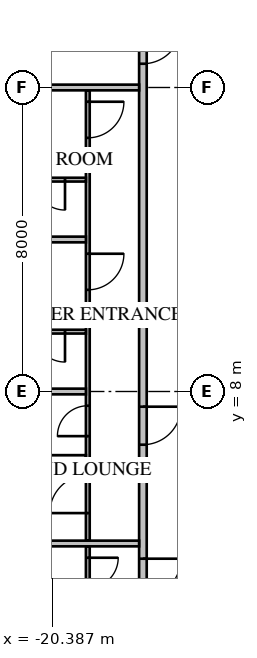
"""IFC4 building model, lengths in metres.
Left out: names, types, materials, properties, quantities, classifications, styles, units other than length and angle.
Written with IfcOpenShell. Run it as: python <this file> out.ifc"""

import sys

from ifc_helpers import new_model, si_unit, direction, frame, frame_2d, origin, place, context, subcontext, project, spatial, rectangle, extrude, element, fill, save


model = new_model("IFC4")
c1 = context("Model", 3, precision=1e-05, world=origin(), true_north=direction((0.0, 1.0)))
c2 = subcontext(c1, "Body", "Model", "MODEL_VIEW")
j1 = project(units=[si_unit("LENGTHUNIT", "METRE"), si_unit("PLANEANGLEUNIT", "RADIAN")], contexts=[c1])
p1 = place(None, origin())
s1 = spatial("IfcSite", under=j1, at=p1, CompositionType="ELEMENT")
p2 = place(p1, origin())
s2 = spatial("IfcBuilding", under=s1, at=p2, CompositionType="ELEMENT")
p3 = place(p2, frame((0.0, 0.0, 23.7)))
s3 = spatial("IfcBuildingStorey", under=s2, at=p3, CompositionType="ELEMENT", Elevation=23.7)
p4 = place(p3, frame((-18.0, 18.0, 0.0), z_axis=(0.0, 0.0, 1.0), x_axis=(0.0, -1.0, 0.0)))
e1 = element("IfcWall", 1, at=p4, inside=s3, PredefinedType="PARTITIONING", context=c2, shape_type="SweptSolid", body=[
    extrude(rectangle(XDim=36.0, YDim=0.2, at=frame_2d((18.0, 0.0))), origin(), (0.0, 0.0, 1.0), 3.65),
])
p5 = place(p4, frame((10.4, 0.0, 0.0)))
e2 = element("IfcOpeningElement", 2, at=p5, cuts=e1, PredefinedType="OPENING", context=c2, shape_type="SweptSolid", body=[
    extrude(rectangle(XDim=1.0, YDim=2.1, at=frame_2d((0.5, 1.05))), frame((0.0, 0.12, 0.0), z_axis=(0.0, -1.0, 0.0), x_axis=(1.0, 0.0, 0.0)), (0.0, 0.0, 1.0), 0.24),
])
p6 = place(p4, frame((14.4, 0.0, 0.0)))
e3 = element("IfcOpeningElement", 3, at=p6, cuts=e1, PredefinedType="OPENING", context=c2, shape_type="SweptSolid", body=[
    extrude(rectangle(XDim=1.0, YDim=2.1, at=frame_2d((0.5, 1.05))), frame((0.0, 0.12, 0.0), z_axis=(0.0, -1.0, 0.0), x_axis=(1.0, 0.0, 0.0)), (0.0, 0.0, 1.0), 0.24),
])
p7 = place(p4, frame((0.375, 0.0, 0.0)))
e4 = element("IfcOpeningElement", 4, at=p7, cuts=e1, PredefinedType="OPENING", context=c2, shape_type="SweptSolid", body=[
    extrude(rectangle(XDim=1.0, YDim=2.1, at=frame_2d((0.5, 1.05))), frame((0.0, 0.12, 0.0), z_axis=(0.0, -1.0, 0.0), x_axis=(1.0, 0.0, 0.0)), (0.0, 0.0, 1.0), 0.24),
])
p8 = place(p4, frame((34.375, 0.0, 0.0)))
e5 = element("IfcOpeningElement", 5, at=p8, cuts=e1, PredefinedType="OPENING", context=c2, shape_type="SweptSolid", body=[
    extrude(rectangle(XDim=0.95, YDim=2.1, at=frame_2d((0.475, 1.05))), frame((0.0, 0.12, 0.0), z_axis=(0.0, -1.0, 0.0), x_axis=(1.0, 0.0, 0.0)), (0.0, 0.0, 1.0), 0.24),
])
p9 = place(p3, frame((-19.45, 15.925, 0.0), z_axis=(0.0, 0.0, 1.0), x_axis=(0.0, -1.0, 0.0)))
e6 = element("IfcWall", 6, at=p9, inside=s3, PredefinedType="PARTITIONING", context=c2, shape_type="SweptSolid", body=[
    extrude(rectangle(XDim=11.85, YDim=0.1, at=frame_2d((5.925, 0.0))), origin(), (0.0, 0.0, 1.0), 3.65),
])
p10 = place(p9, frame((10.125, 0.0, 0.0)))
e7 = element("IfcOpeningElement", 7, at=p10, cuts=e6, PredefinedType="OPENING", context=c2, shape_type="SweptSolid", body=[
    extrude(rectangle(XDim=1.0, YDim=2.1, at=frame_2d((0.5, 1.05))), frame((0.0, 0.07, 0.0), z_axis=(0.0, -1.0, 0.0), x_axis=(1.0, 0.0, 0.0)), (0.0, 0.0, 1.0), 0.14),
])
p11 = place(p9, frame((8.3, 0.0, 0.0)))
e8 = element("IfcOpeningElement", 8, at=p11, cuts=e6, PredefinedType="OPENING", context=c2, shape_type="SweptSolid", body=[
    extrude(rectangle(XDim=0.8, YDim=2.1, at=frame_2d((0.4, 1.05))), frame((0.0, 0.07, 0.0), z_axis=(0.0, -1.0, 0.0), x_axis=(1.0, 0.0, 0.0)), (0.0, 0.0, 1.0), 0.14),
])
p12 = place(p9, frame((0.3, 0.0, 0.0)))
e9 = element("IfcOpeningElement", 9, at=p12, cuts=e6, PredefinedType="OPENING", context=c2, shape_type="SweptSolid", body=[
    extrude(rectangle(XDim=0.95, YDim=2.1, at=frame_2d((0.475, 1.05))), frame((0.0, 0.07, 0.0), z_axis=(0.0, -1.0, 0.0), x_axis=(1.0, 0.0, 0.0)), (0.0, 0.0, 1.0), 0.14),
])
p13 = place(p9, frame((4.3, 0.0, 0.0)))
e10 = element("IfcOpeningElement", 10, at=p13, cuts=e6, PredefinedType="OPENING", context=c2, shape_type="SweptSolid", body=[
    extrude(rectangle(XDim=0.95, YDim=2.1, at=frame_2d((0.475, 1.05))), frame((0.0, 0.07, 0.0), z_axis=(0.0, -1.0, 0.0), x_axis=(1.0, 0.0, 0.0)), (0.0, 0.0, 1.0), 0.14),
])
p14 = place(p3, frame((-19.5, 6.275, 0.0), z_axis=(0.0, 0.0, 1.0), x_axis=(-1.0, 0.0, 0.0)))
e11 = element("IfcWall", 11, at=p14, inside=s3, PredefinedType="PARTITIONING", context=c2, shape_type="SweptSolid", body=[
    extrude(rectangle(XDim=2.1, YDim=0.1, at=frame_2d((1.05, 0.0))), origin(), (0.0, 0.0, 1.0), 3.65),
])
p15 = place(p3, frame((-19.45, 3.925, 0.0), z_axis=(0.0, 0.0, 1.0), x_axis=(0.0, -1.0, 0.0)))
e12 = element("IfcWall", 12, at=p15, inside=s3, PredefinedType="PARTITIONING", context=c2, shape_type="SweptSolid", body=[
    extrude(rectangle(XDim=19.85, YDim=0.1, at=frame_2d((9.925, 0.0))), origin(), (0.0, 0.0, 1.0), 3.65),
])
p16 = place(p15, frame((2.125, 0.0, 0.0)))
e13 = element("IfcOpeningElement", 13, at=p16, cuts=e12, PredefinedType="OPENING", context=c2, shape_type="SweptSolid", body=[
    extrude(rectangle(XDim=1.0, YDim=2.1, at=frame_2d((0.5, 1.05))), frame((0.0, 0.07, 0.0), z_axis=(0.0, -1.0, 0.0), x_axis=(1.0, 0.0, 0.0)), (0.0, 0.0, 1.0), 0.14),
])
p17 = place(p15, frame((0.3, 0.0, 0.0)))
e14 = element("IfcOpeningElement", 14, at=p17, cuts=e12, PredefinedType="OPENING", context=c2, shape_type="SweptSolid", body=[
    extrude(rectangle(XDim=0.8, YDim=2.1, at=frame_2d((0.4, 1.05))), frame((0.0, 0.07, 0.0), z_axis=(0.0, -1.0, 0.0), x_axis=(1.0, 0.0, 0.0)), (0.0, 0.0, 1.0), 0.14),
])
p18 = place(p15, frame((4.3, 0.0, 0.0)))
e15 = element("IfcOpeningElement", 15, at=p18, cuts=e12, PredefinedType="OPENING", context=c2, shape_type="SweptSolid", body=[
    extrude(rectangle(XDim=0.95, YDim=2.1, at=frame_2d((0.475, 1.05))), frame((0.0, 0.07, 0.0), z_axis=(0.0, -1.0, 0.0), x_axis=(1.0, 0.0, 0.0)), (0.0, 0.0, 1.0), 0.14),
])
p19 = place(p15, frame((8.3, 0.0, 0.0)))
e16 = element("IfcOpeningElement", 16, at=p19, cuts=e12, PredefinedType="OPENING", context=c2, shape_type="SweptSolid", body=[
    extrude(rectangle(XDim=0.95, YDim=2.1, at=frame_2d((0.475, 1.05))), frame((0.0, 0.07, 0.0), z_axis=(0.0, -1.0, 0.0), x_axis=(1.0, 0.0, 0.0)), (0.0, 0.0, 1.0), 0.14),
])
p20 = place(p15, frame((12.3, 0.0, 0.0)))
e17 = element("IfcOpeningElement", 17, at=p20, cuts=e12, PredefinedType="OPENING", context=c2, shape_type="SweptSolid", body=[
    extrude(rectangle(XDim=0.95, YDim=2.1, at=frame_2d((0.475, 1.05))), frame((0.0, 0.07, 0.0), z_axis=(0.0, -1.0, 0.0), x_axis=(1.0, 0.0, 0.0)), (0.0, 0.0, 1.0), 0.14),
])
p21 = place(p15, frame((16.3, 0.0, 0.0)))
e18 = element("IfcOpeningElement", 18, at=p21, cuts=e12, PredefinedType="OPENING", context=c2, shape_type="SweptSolid", body=[
    extrude(rectangle(XDim=0.95, YDim=2.1, at=frame_2d((0.475, 1.05))), frame((0.0, 0.07, 0.0), z_axis=(0.0, -1.0, 0.0), x_axis=(1.0, 0.0, 0.0)), (0.0, 0.0, 1.0), 0.14),
])
p22 = place(p3, frame((-18.1, 16.0, 0.0), z_axis=(0.0, 0.0, 1.0), x_axis=(-1.0, 0.0, 0.0)))
e19 = element("IfcWall", 19, at=p22, inside=s3, PredefinedType="PARTITIONING", context=c2, shape_type="SweptSolid", body=[
    extrude(rectangle(XDim=6.589, YDim=0.15, at=frame_2d((3.295, 0.0))), origin(), (0.0, 0.0, 1.0), 3.65),
])
for number, where, z_axis, x_axis in (
    (20, (-19.5, 12.0, 0.0), (0.0, 0.0, 1.0), (-1.0, 0.0, 0.0)),
    (21, (-19.5, 8.0, 0.0), (0.0, 0.0, 1.0), (-1.0, 0.0, 0.0)),
):
    element("IfcWall", number, at=place(p3, frame(where, z_axis=z_axis, x_axis=x_axis)), inside=s3, PredefinedType="PARTITIONING", context=c2, shape_type="SweptSolid", body=[
        extrude(rectangle(XDim=5.2, YDim=0.15, at=frame_2d((2.6, 0.0))), origin(), (0.0, 0.0, 1.0), 3.65),
    ])
p23 = place(p3, frame((-18.1, 4.0, 0.0), z_axis=(0.0, 0.0, 1.0), x_axis=(-1.0, 0.0, 0.0)))
e22 = element("IfcWall", 22, at=p23, inside=s3, PredefinedType="PARTITIONING", context=c2, shape_type="SweptSolid", body=[
    extrude(rectangle(XDim=6.6, YDim=0.15, at=frame_2d((3.3, 0.0))), origin(), (0.0, 0.0, 1.0), 3.65),
])
p24 = place(p3, frame((-19.5, 13.575, 0.0), z_axis=(0.0, 0.0, 1.0), x_axis=(-1.0, 0.0, 0.0)))
e23 = element("IfcWall", 23, at=p24, inside=s3, PredefinedType="PARTITIONING", context=c2, shape_type="SweptSolid", body=[
    extrude(rectangle(XDim=2.7, YDim=0.1, at=frame_2d((1.35, 0.0))), origin(), (0.0, 0.0, 1.0), 3.65),
])
p25 = place(p24, frame((0.55, 0.0, 0.0)))
e24 = element("IfcOpeningElement", 24, at=p25, cuts=e23, PredefinedType="OPENING", context=c2, shape_type="SweptSolid", body=[
    extrude(rectangle(XDim=0.8, YDim=2.1, at=frame_2d((0.4, 1.05))), frame((0.0, 0.07, 0.0), z_axis=(0.0, -1.0, 0.0), x_axis=(1.0, 0.0, 0.0)), (0.0, 0.0, 1.0), 0.14),
])
p26 = place(p3, frame((-19.5, 9.575, 0.0), z_axis=(0.0, 0.0, 1.0), x_axis=(-1.0, 0.0, 0.0)))
e25 = element("IfcWall", 25, at=p26, inside=s3, PredefinedType="PARTITIONING", context=c2, shape_type="SweptSolid", body=[
    extrude(rectangle(XDim=2.7, YDim=0.1, at=frame_2d((1.35, 0.0))), origin(), (0.0, 0.0, 1.0), 3.65),
])
p27 = place(p26, frame((0.55, 0.0, 0.0)))
e26 = element("IfcOpeningElement", 26, at=p27, cuts=e25, PredefinedType="OPENING", context=c2, shape_type="SweptSolid", body=[
    extrude(rectangle(XDim=0.8, YDim=2.1, at=frame_2d((0.4, 1.05))), frame((0.0, 0.07, 0.0), z_axis=(0.0, -1.0, 0.0), x_axis=(1.0, 0.0, 0.0)), (0.0, 0.0, 1.0), 0.14),
])
p28 = place(p5, origin())
e27 = element("IfcDoor", 27, at=p28, inside=s3, OperationType="SINGLE_SWING_LEFT", PredefinedType="DOOR", context=c2, shape_type="SweptSolid", body=[
    extrude(rectangle(XDim=1.0, YDim=2.1, at=frame_2d((0.5, 1.05))), frame((0.0, 0.025, 0.0), z_axis=(0.0, -1.0, 0.0), x_axis=(1.0, 0.0, 0.0)), (0.0, 0.0, 1.0), 0.05),
])
fill(e2, e27)
p29 = place(p10, origin())
e28 = element("IfcDoor", 28, at=p29, inside=s3, OperationType="SINGLE_SWING_RIGHT", PredefinedType="DOOR", context=c2, shape_type="SweptSolid", body=[
    extrude(rectangle(XDim=1.0, YDim=2.1, at=frame_2d((0.5, 1.05))), frame((0.0, 0.025, 0.0), z_axis=(0.0, -1.0, 0.0), x_axis=(1.0, 0.0, 0.0)), (0.0, 0.0, 1.0), 0.05),
])
fill(e7, e28)
p30 = place(p11, origin())
e29 = element("IfcDoor", 29, at=p30, inside=s3, OperationType="SINGLE_SWING_RIGHT", PredefinedType="DOOR", context=c2, shape_type="SweptSolid", body=[
    extrude(rectangle(XDim=0.8, YDim=2.1, at=frame_2d((0.4, 1.05))), frame((0.0, 0.025, 0.0), z_axis=(0.0, -1.0, 0.0), x_axis=(1.0, 0.0, 0.0)), (0.0, 0.0, 1.0), 0.05),
])
fill(e8, e29)
p31 = place(p6, origin())
e30 = element("IfcDoor", 30, at=p31, inside=s3, OperationType="SINGLE_SWING_LEFT", PredefinedType="DOOR", context=c2, shape_type="SweptSolid", body=[
    extrude(rectangle(XDim=1.0, YDim=2.1, at=frame_2d((0.5, 1.05))), frame((0.0, 0.025, 0.0), z_axis=(0.0, -1.0, 0.0), x_axis=(1.0, 0.0, 0.0)), (0.0, 0.0, 1.0), 0.05),
])
fill(e3, e30)
p32 = place(p17, origin())
e31 = element("IfcDoor", 31, at=p32, inside=s3, OperationType="SINGLE_SWING_LEFT", PredefinedType="DOOR", context=c2, shape_type="SweptSolid", body=[
    extrude(rectangle(XDim=0.8, YDim=2.1, at=frame_2d((0.4, 1.05))), frame((0.0, 0.025, 0.0), z_axis=(0.0, -1.0, 0.0), x_axis=(1.0, 0.0, 0.0)), (0.0, 0.0, 1.0), 0.05),
])
fill(e14, e31)
p33 = place(p7, origin())
e32 = element("IfcDoor", 32, at=p33, inside=s3, OperationType="SINGLE_SWING_LEFT", PredefinedType="DOOR", context=c2, shape_type="SweptSolid", body=[
    extrude(rectangle(XDim=1.0, YDim=2.1, at=frame_2d((0.5, 1.05))), frame((0.0, 0.025, 0.0), z_axis=(0.0, -1.0, 0.0), x_axis=(1.0, 0.0, 0.0)), (0.0, 0.0, 1.0), 0.05),
])
fill(e4, e32)
p34 = place(p12, origin())
e33 = element("IfcDoor", 33, at=p34, inside=s3, OperationType="SINGLE_SWING_LEFT", PredefinedType="DOOR", context=c2, shape_type="SweptSolid", body=[
    extrude(rectangle(XDim=0.95, YDim=2.1, at=frame_2d((0.475, 1.05))), frame((0.0, 0.025, 0.0), z_axis=(0.0, -1.0, 0.0), x_axis=(1.0, 0.0, 0.0)), (0.0, 0.0, 1.0), 0.05),
])
fill(e9, e33)
p35 = place(p25, origin())
e34 = element("IfcDoor", 34, at=p35, inside=s3, OperationType="SINGLE_SWING_LEFT", PredefinedType="DOOR", context=c2, shape_type="SweptSolid", body=[
    extrude(rectangle(XDim=0.8, YDim=2.1, at=frame_2d((0.4, 1.05))), frame((0.0, 0.025, 0.0), z_axis=(0.0, -1.0, 0.0), x_axis=(1.0, 0.0, 0.0)), (0.0, 0.0, 1.0), 0.05),
])
fill(e24, e34)
p36 = place(p13, origin())
e35 = element("IfcDoor", 35, at=p36, inside=s3, OperationType="SINGLE_SWING_LEFT", PredefinedType="DOOR", context=c2, shape_type="SweptSolid", body=[
    extrude(rectangle(XDim=0.95, YDim=2.1, at=frame_2d((0.475, 1.05))), frame((0.0, 0.025, 0.0), z_axis=(0.0, -1.0, 0.0), x_axis=(1.0, 0.0, 0.0)), (0.0, 0.0, 1.0), 0.05),
])
fill(e10, e35)
p37 = place(p27, origin())
e36 = element("IfcDoor", 36, at=p37, inside=s3, OperationType="SINGLE_SWING_LEFT", PredefinedType="DOOR", context=c2, shape_type="SweptSolid", body=[
    extrude(rectangle(XDim=0.8, YDim=2.1, at=frame_2d((0.4, 1.05))), frame((0.0, 0.025, 0.0), z_axis=(0.0, -1.0, 0.0), x_axis=(1.0, 0.0, 0.0)), (0.0, 0.0, 1.0), 0.05),
])
fill(e26, e36)
save(model, sys.argv[1])
